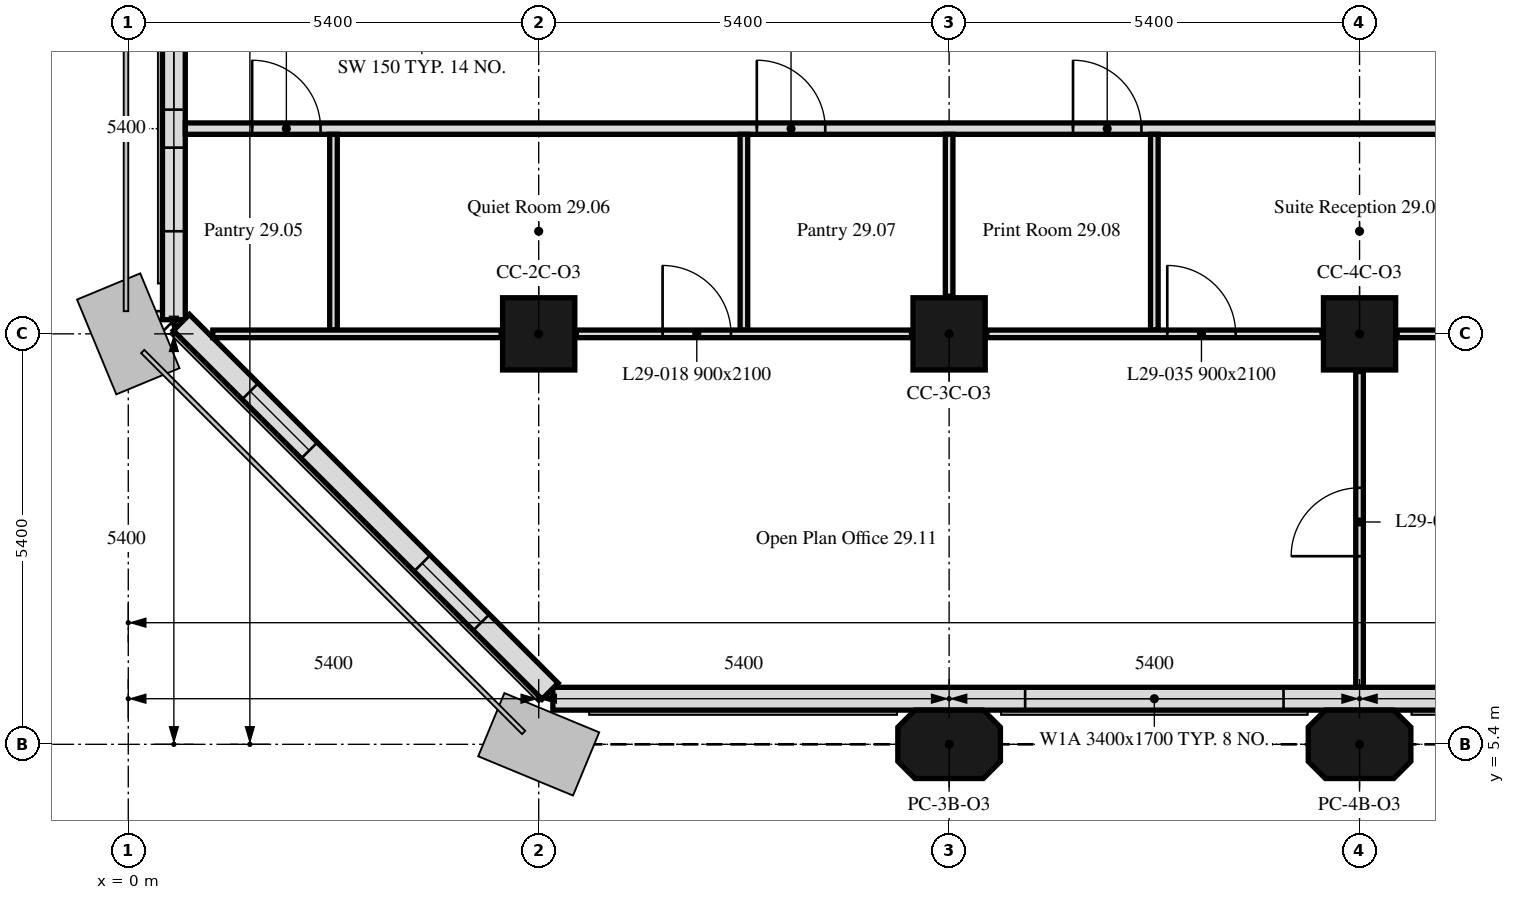
"""IFC4 building model, lengths in metres.
Left out: names, types, materials, properties, quantities, classifications, styles, units other than length and angle.
Written with IfcOpenShell. Run it as: python <this file> out.ifc"""

import sys

from ifc_helpers import new_model, si_unit, direction, frame, frame_2d, origin, origin_2d, place, context, subcontext, project, spatial, polyline, rectangle, outline, extrude, element, fill, save


model = new_model("IFC4")
c1 = context("Model", 3, precision=1e-05, world=origin(), true_north=direction((0.0, 1.0)))
c2 = subcontext(c1, "Body", "Model", "MODEL_VIEW")
j1 = project(units=[si_unit("LENGTHUNIT", "METRE"), si_unit("PLANEANGLEUNIT", "RADIAN")], contexts=[c1])
p1 = place(None, origin())
s1 = spatial("IfcSite", under=j1, at=p1, CompositionType="ELEMENT")
p2 = place(p1, origin())
s2 = spatial("IfcBuilding", under=s1, at=p2, CompositionType="ELEMENT")
p3 = place(p2, frame((0.0, 0.0, 122.0)))
s3 = spatial("IfcBuildingStorey", under=s2, at=p3, CompositionType="ELEMENT", Elevation=122.0)
for number, where, z_axis, x_axis in (
    (1, (10.8, 5.4, 0.0), (0.0, 0.0, 1.0), (1.0, 0.0, 0.0)),
    (2, (16.2, 5.4, 0.0), (0.0, 0.0, 1.0), (1.0, 0.0, 0.0)),
):
    element("IfcColumn", number, at=place(p3, frame(where, z_axis=z_axis, x_axis=x_axis)), inside=s3, PredefinedType="COLUMN", context=c2, shape_type="SweptSolid", body=[
        extrude(outline(polyline([(-0.45, -0.45), (0.45, -0.45), (0.675, -0.225), (0.675, 0.225), (0.45, 0.45), (-0.45, 0.45), (-0.675, 0.225), (-0.675, -0.225), (-0.45, -0.45)])), origin(), (0.0, 0.0, 1.0), 3.3),
    ])
for number, where, z_axis, x_axis in (
    (3, (5.4, 10.8, 0.0), (0.0, 0.0, 1.0), (1.0, 0.0, 0.0)),
    (4, (10.8, 10.8, 0.0), (0.0, 0.0, 1.0), (1.0, 0.0, 0.0)),
    (5, (16.2, 10.8, 0.0), (0.0, 0.0, 1.0), (1.0, 0.0, 0.0)),
):
    element("IfcColumn", number, at=place(p3, frame(where, z_axis=z_axis, x_axis=x_axis)), inside=s3, PredefinedType="COLUMN", context=c2, shape_type="SweptSolid", body=[
        extrude(rectangle(XDim=0.95, YDim=0.95, at=origin_2d()), origin(), (0.0, 0.0, 1.0), 3.3),
    ])
p4 = place(p3, frame((5.586, 6.0, 0.0), z_axis=(0.0, 0.0, 1.0), x_axis=(1.0, 0.0, 0.0)))
e6 = element("IfcWall", 6, at=p4, inside=s3, PredefinedType="SOLIDWALL", context=c2, shape_type="SweptSolid", body=[
    extrude(rectangle(XDim=32.027, YDim=0.3, at=frame_2d((16.014, 0.0))), origin(), (0.0, 0.0, 1.0), 3.3),
])
p5 = place(p4, frame((6.214, 0.0, 0.9)))
e7 = element("IfcOpeningElement", 7, at=p5, cuts=e6, PredefinedType="OPENING", context=c2, shape_type="SweptSolid", body=[
    extrude(rectangle(XDim=3.4, YDim=1.7, at=frame_2d((1.7, 0.85))), frame((0.0, 0.16, 0.0), z_axis=(0.0, -1.0, 0.0), x_axis=(1.0, 0.0, 0.0)), (0.0, 0.0, 1.0), 0.32),
])
p6 = place(p4, frame((17.014, 0.0, 0.9)))
e8 = element("IfcOpeningElement", 8, at=p6, cuts=e6, PredefinedType="OPENING", context=c2, shape_type="SweptSolid", body=[
    extrude(rectangle(XDim=3.4, YDim=1.7, at=frame_2d((1.7, 0.85))), frame((0.0, 0.16, 0.0), z_axis=(0.0, -1.0, 0.0), x_axis=(1.0, 0.0, 0.0)), (0.0, 0.0, 1.0), 0.32),
])
p7 = place(p4, frame((27.814, 0.0, 0.9)))
e9 = element("IfcOpeningElement", 9, at=p7, cuts=e6, PredefinedType="OPENING", context=c2, shape_type="SweptSolid", body=[
    extrude(rectangle(XDim=3.4, YDim=1.7, at=frame_2d((1.7, 0.85))), frame((0.0, 0.16, 0.0), z_axis=(0.0, -1.0, 0.0), x_axis=(1.0, 0.0, 0.0)), (0.0, 0.0, 1.0), 0.32),
])
p8 = place(p3, frame((0.6, 43.014, 0.0), z_axis=(0.0, 0.0, 1.0), x_axis=(0.0, -1.0, 0.0)))
e10 = element("IfcWall", 10, at=p8, inside=s3, PredefinedType="SOLIDWALL", context=c2, shape_type="SweptSolid", body=[
    extrude(rectangle(XDim=32.027, YDim=0.3, at=frame_2d((16.014, 0.0))), origin(), (0.0, 0.0, 1.0), 3.3),
])
p9 = place(p8, frame((6.564, 0.0, 0.9)))
e11 = element("IfcOpeningElement", 11, at=p9, cuts=e10, PredefinedType="OPENING", context=c2, shape_type="SweptSolid", body=[
    extrude(rectangle(XDim=1.1, YDim=1.7, at=frame_2d((0.55, 0.85))), frame((0.0, 0.16, 0.0), z_axis=(0.0, -1.0, 0.0), x_axis=(1.0, 0.0, 0.0)), (0.0, 0.0, 1.0), 0.32),
])
p10 = place(p8, frame((8.164, 0.0, 0.9)))
e12 = element("IfcOpeningElement", 12, at=p10, cuts=e10, PredefinedType="OPENING", context=c2, shape_type="SweptSolid", body=[
    extrude(rectangle(XDim=1.1, YDim=1.7, at=frame_2d((0.55, 0.85))), frame((0.0, 0.16, 0.0), z_axis=(0.0, -1.0, 0.0), x_axis=(1.0, 0.0, 0.0)), (0.0, 0.0, 1.0), 0.32),
])
p11 = place(p8, frame((17.014, 0.0, 0.9)))
e13 = element("IfcOpeningElement", 13, at=p11, cuts=e10, PredefinedType="OPENING", context=c2, shape_type="SweptSolid", body=[
    extrude(rectangle(XDim=3.4, YDim=1.7, at=frame_2d((1.7, 0.85))), frame((0.0, 0.16, 0.0), z_axis=(0.0, -1.0, 0.0), x_axis=(1.0, 0.0, 0.0)), (0.0, 0.0, 1.0), 0.32),
])
p12 = place(p8, frame((28.164, 0.0, 0.9)))
e14 = element("IfcOpeningElement", 14, at=p12, cuts=e10, PredefinedType="OPENING", context=c2, shape_type="SweptSolid", body=[
    extrude(rectangle(XDim=1.1, YDim=1.7, at=frame_2d((0.55, 0.85))), frame((0.0, 0.16, 0.0), z_axis=(0.0, -1.0, 0.0), x_axis=(1.0, 0.0, 0.0)), (0.0, 0.0, 1.0), 0.32),
])
p13 = place(p8, frame((29.764, 0.0, 0.9)))
e15 = element("IfcOpeningElement", 15, at=p13, cuts=e10, PredefinedType="OPENING", context=c2, shape_type="SweptSolid", body=[
    extrude(rectangle(XDim=1.1, YDim=1.7, at=frame_2d((0.55, 0.85))), frame((0.0, 0.16, 0.0), z_axis=(0.0, -1.0, 0.0), x_axis=(1.0, 0.0, 0.0)), (0.0, 0.0, 1.0), 0.32),
])
p14 = place(p3, frame((0.699, 10.949, 0.0), z_axis=(0.0, 0.0, 1.0), x_axis=(0.707106781187, -0.707106781187, 0.0)))
e16 = element("IfcWall", 16, at=p14, inside=s3, PredefinedType="SOLIDWALL", context=c2, shape_type="SweptSolid", body=[
    extrude(rectangle(XDim=6.86, YDim=0.3, at=frame_2d((3.43, 0.0))), origin(), (0.0, 0.0, 1.0), 3.3),
])
p15 = place(p14, frame((1.28, 0.0, 0.9)))
e17 = element("IfcOpeningElement", 17, at=p15, cuts=e16, PredefinedType="OPENING", context=c2, shape_type="SweptSolid", body=[
    extrude(rectangle(XDim=1.1, YDim=1.7, at=frame_2d((0.55, 0.85))), frame((0.0, 0.16, 0.0), z_axis=(0.0, -1.0, 0.0), x_axis=(1.0, 0.0, 0.0)), (0.0, 0.0, 1.0), 0.32),
])
p16 = place(p14, frame((4.48, 0.0, 0.9)))
e18 = element("IfcOpeningElement", 18, at=p16, cuts=e16, PredefinedType="OPENING", context=c2, shape_type="SweptSolid", body=[
    extrude(rectangle(XDim=1.1, YDim=1.7, at=frame_2d((0.55, 0.85))), frame((0.0, 0.16, 0.0), z_axis=(0.0, -1.0, 0.0), x_axis=(1.0, 0.0, 0.0)), (0.0, 0.0, 1.0), 0.32),
])
p17 = place(p3, frame((0.751, 13.5, 0.0), z_axis=(0.0, 0.0, 1.0), x_axis=(1.0, 0.0, 0.0)))
e19 = element("IfcWall", 19, at=p17, inside=s3, PredefinedType="PARTITIONING", context=c2, shape_type="SweptSolid", body=[
    extrude(rectangle(XDim=41.698, YDim=0.15, at=frame_2d((20.849, 0.0))), origin(), (0.0, 0.0, 1.0), 2.55),
])
p18 = place(p17, frame((0.879, 0.0, 0.0)))
e20 = element("IfcOpeningElement", 20, at=p18, cuts=e19, PredefinedType="OPENING", context=c2, shape_type="SweptSolid", body=[
    extrude(rectangle(XDim=0.9, YDim=2.1, at=frame_2d((0.45, 1.05))), frame((0.0, 0.075, 0.0), z_axis=(0.0, -1.0, 0.0), x_axis=(1.0, 0.0, 0.0)), (0.0, 0.0, 1.0), 0.15),
])
p19 = place(p17, frame((7.519, 0.0, 0.0)))
e21 = element("IfcOpeningElement", 21, at=p19, cuts=e19, PredefinedType="OPENING", context=c2, shape_type="SweptSolid", body=[
    extrude(rectangle(XDim=0.9, YDim=2.1, at=frame_2d((0.45, 1.05))), frame((0.0, 0.075, 0.0), z_axis=(0.0, -1.0, 0.0), x_axis=(1.0, 0.0, 0.0)), (0.0, 0.0, 1.0), 0.15),
])
p20 = place(p17, frame((11.679, 0.0, 0.0)))
e22 = element("IfcOpeningElement", 22, at=p20, cuts=e19, PredefinedType="OPENING", context=c2, shape_type="SweptSolid", body=[
    extrude(rectangle(XDim=0.9, YDim=2.1, at=frame_2d((0.45, 1.05))), frame((0.0, 0.075, 0.0), z_axis=(0.0, -1.0, 0.0), x_axis=(1.0, 0.0, 0.0)), (0.0, 0.0, 1.0), 0.15),
])
p21 = place(p17, frame((22.479, 0.0, 0.0)))
e23 = element("IfcOpeningElement", 23, at=p21, cuts=e19, PredefinedType="OPENING", context=c2, shape_type="SweptSolid", body=[
    extrude(rectangle(XDim=0.9, YDim=2.1, at=frame_2d((0.45, 1.05))), frame((0.0, 0.075, 0.0), z_axis=(0.0, -1.0, 0.0), x_axis=(1.0, 0.0, 0.0)), (0.0, 0.0, 1.0), 0.15),
])
p22 = place(p17, frame((33.899, 0.0, 0.0)))
e24 = element("IfcOpeningElement", 24, at=p22, cuts=e19, PredefinedType="OPENING", context=c2, shape_type="SweptSolid", body=[
    extrude(rectangle(XDim=0.9, YDim=2.1, at=frame_2d((0.45, 1.05))), frame((0.0, 0.075, 0.0), z_axis=(0.0, -1.0, 0.0), x_axis=(1.0, 0.0, 0.0)), (0.0, 0.0, 1.0), 0.15),
])
p23 = place(p17, frame((17.079, 0.0, 0.0)))
e25 = element("IfcOpeningElement", 25, at=p23, cuts=e19, PredefinedType="OPENING", context=c2, shape_type="SweptSolid", body=[
    extrude(rectangle(XDim=0.9, YDim=2.1, at=frame_2d((0.45, 1.05))), frame((0.0, 0.075, 0.0), z_axis=(0.0, -1.0, 0.0), x_axis=(1.0, 0.0, 0.0)), (0.0, 0.0, 1.0), 0.15),
])
p24 = place(p17, frame((27.879, 0.0, 0.0)))
e26 = element("IfcOpeningElement", 26, at=p24, cuts=e19, PredefinedType="OPENING", context=c2, shape_type="SweptSolid", body=[
    extrude(rectangle(XDim=0.9, YDim=2.1, at=frame_2d((0.45, 1.05))), frame((0.0, 0.075, 0.0), z_axis=(0.0, -1.0, 0.0), x_axis=(1.0, 0.0, 0.0)), (0.0, 0.0, 1.0), 0.15),
])
p25 = place(p3, frame((2.7, 10.85, 0.0), z_axis=(0.0, 0.0, 1.0), x_axis=(0.0, 1.0, 0.0)))
e27 = element("IfcWall", 27, at=p25, inside=s3, PredefinedType="PARTITIONING", context=c2, shape_type="SweptSolid", body=[
    extrude(rectangle(XDim=2.575, YDim=0.1, at=frame_2d((1.288, 0.0))), origin(), (0.0, 0.0, 1.0), 3.3),
])
p26 = place(p3, frame((1.112, 10.8, 0.0), z_axis=(0.0, 0.0, 1.0), x_axis=(1.0, 0.0, 0.0)))
e28 = element("IfcWall", 28, at=p26, inside=s3, PredefinedType="PARTITIONING", context=c2, shape_type="SweptSolid", body=[
    extrude(rectangle(XDim=3.793, YDim=0.1, at=frame_2d((1.896, 0.0))), origin(), (0.0, 0.0, 1.0), 2.55),
])
p27 = place(p3, frame((8.1, 10.85, 0.0), z_axis=(0.0, 0.0, 1.0), x_axis=(0.0, 1.0, 0.0)))
e29 = element("IfcWall", 29, at=p27, inside=s3, PredefinedType="PARTITIONING", context=c2, shape_type="SweptSolid", body=[
    extrude(rectangle(XDim=2.575, YDim=0.1, at=frame_2d((1.288, 0.0))), origin(), (0.0, 0.0, 1.0), 3.3),
])
p28 = place(p3, frame((5.895, 10.8, 0.0), z_axis=(0.0, 0.0, 1.0), x_axis=(1.0, 0.0, 0.0)))
e30 = element("IfcWall", 30, at=p28, inside=s3, PredefinedType="PARTITIONING", context=c2, shape_type="SweptSolid", body=[
    extrude(rectangle(XDim=4.41, YDim=0.1, at=frame_2d((2.205, 0.0))), origin(), (0.0, 0.0, 1.0), 2.55),
])
p29 = place(p28, frame((1.135, 0.0, 0.0)))
e31 = element("IfcOpeningElement", 31, at=p29, cuts=e30, PredefinedType="OPENING", context=c2, shape_type="SweptSolid", body=[
    extrude(rectangle(XDim=0.9, YDim=2.1, at=frame_2d((0.45, 1.05))), frame((0.0, 0.05, 0.0), z_axis=(0.0, -1.0, 0.0), x_axis=(1.0, 0.0, 0.0)), (0.0, 0.0, 1.0), 0.1),
])
p30 = place(p3, frame((10.8, 11.295, 0.0), z_axis=(0.0, 0.0, 1.0), x_axis=(0.0, 1.0, 0.0)))
e32 = element("IfcWall", 32, at=p30, inside=s3, PredefinedType="PARTITIONING", context=c2, shape_type="SweptSolid", body=[
    extrude(rectangle(XDim=2.13, YDim=0.1, at=frame_2d((1.065, 0.0))), origin(), (0.0, 0.0, 1.0), 2.55),
])
p31 = place(p3, frame((13.5, 10.85, 0.0), z_axis=(0.0, 0.0, 1.0), x_axis=(0.0, 1.0, 0.0)))
e33 = element("IfcWall", 33, at=p31, inside=s3, PredefinedType="PARTITIONING", context=c2, shape_type="SweptSolid", body=[
    extrude(rectangle(XDim=2.575, YDim=0.1, at=frame_2d((1.288, 0.0))), origin(), (0.0, 0.0, 1.0), 3.3),
])
p32 = place(p3, frame((11.295, 10.8, 0.0), z_axis=(0.0, 0.0, 1.0), x_axis=(1.0, 0.0, 0.0)))
e34 = element("IfcWall", 34, at=p32, inside=s3, PredefinedType="PARTITIONING", context=c2, shape_type="SweptSolid", body=[
    extrude(rectangle(XDim=4.41, YDim=0.1, at=frame_2d((2.205, 0.0))), origin(), (0.0, 0.0, 1.0), 2.55),
])
p33 = place(p32, frame((2.375, 0.0, 0.0)))
e35 = element("IfcOpeningElement", 35, at=p33, cuts=e34, PredefinedType="OPENING", context=c2, shape_type="SweptSolid", body=[
    extrude(rectangle(XDim=0.9, YDim=2.1, at=frame_2d((0.45, 1.05))), frame((0.0, 0.05, 0.0), z_axis=(0.0, -1.0, 0.0), x_axis=(1.0, 0.0, 0.0)), (0.0, 0.0, 1.0), 0.1),
])
p34 = place(p3, frame((16.695, 10.8, 0.0), z_axis=(0.0, 0.0, 1.0), x_axis=(1.0, 0.0, 0.0)))
e36 = element("IfcWall", 36, at=p34, inside=s3, PredefinedType="PARTITIONING", context=c2, shape_type="SweptSolid", body=[
    extrude(rectangle(XDim=4.41, YDim=0.1, at=frame_2d((2.205, 0.0))), origin(), (0.0, 0.0, 1.0), 3.3),
])
p35 = place(p3, frame((16.2, 6.151, 0.0), z_axis=(0.0, 0.0, 1.0), x_axis=(0.0, 1.0, 0.0)))
e37 = element("IfcWall", 37, at=p35, inside=s3, PredefinedType="PARTITIONING", context=c2, shape_type="SweptSolid", body=[
    extrude(rectangle(XDim=4.154, YDim=0.1, at=frame_2d((2.077, 0.0))), origin(), (0.0, 0.0, 1.0), 2.55),
])
p36 = place(p35, frame((1.724, 0.0, 0.0)))
e38 = element("IfcOpeningElement", 38, at=p36, cuts=e37, PredefinedType="OPENING", context=c2, shape_type="SweptSolid", body=[
    extrude(rectangle(XDim=0.9, YDim=2.1, at=frame_2d((0.45, 1.05))), frame((0.0, 0.05, 0.0), z_axis=(0.0, -1.0, 0.0), x_axis=(1.0, 0.0, 0.0)), (0.0, 0.0, 1.0), 0.1),
])
p37 = place(p5, origin())
e39 = element("IfcWindow", 39, at=p37, inside=s3, PartitioningType="SINGLE_PANEL", PredefinedType="WINDOW", context=c2, shape_type="SweptSolid", body=[
    extrude(rectangle(XDim=3.4, YDim=1.7, at=frame_2d((1.7, 0.85))), frame((0.0, 0.03, 0.0), z_axis=(0.0, -1.0, 0.0), x_axis=(1.0, 0.0, 0.0)), (0.0, 0.0, 1.0), 0.06),
])
fill(e7, e39)
p38 = place(p12, origin())
e40 = element("IfcWindow", 40, at=p38, inside=s3, PartitioningType="SINGLE_PANEL", PredefinedType="WINDOW", context=c2, shape_type="SweptSolid", body=[
    extrude(rectangle(XDim=1.1, YDim=1.7, at=frame_2d((0.55, 0.85))), frame((0.0, 0.03, 0.0), z_axis=(0.0, -1.0, 0.0), x_axis=(1.0, 0.0, 0.0)), (0.0, 0.0, 1.0), 0.06),
])
fill(e14, e40)
p39 = place(p13, origin())
e41 = element("IfcWindow", 41, at=p39, inside=s3, PartitioningType="SINGLE_PANEL", PredefinedType="WINDOW", context=c2, shape_type="SweptSolid", body=[
    extrude(rectangle(XDim=1.1, YDim=1.7, at=frame_2d((0.55, 0.85))), frame((0.0, 0.03, 0.0), z_axis=(0.0, -1.0, 0.0), x_axis=(1.0, 0.0, 0.0)), (0.0, 0.0, 1.0), 0.06),
])
fill(e15, e41)
p40 = place(p15, origin())
e42 = element("IfcWindow", 42, at=p40, inside=s3, PartitioningType="SINGLE_PANEL", PredefinedType="WINDOW", context=c2, shape_type="SweptSolid", body=[
    extrude(rectangle(XDim=1.1, YDim=1.7, at=frame_2d((0.55, 0.85))), frame((0.0, 0.03, 0.0), z_axis=(0.0, -1.0, 0.0), x_axis=(1.0, 0.0, 0.0)), (0.0, 0.0, 1.0), 0.06),
])
fill(e17, e42)
p41 = place(p16, origin())
e43 = element("IfcWindow", 43, at=p41, inside=s3, PartitioningType="SINGLE_PANEL", PredefinedType="WINDOW", context=c2, shape_type="SweptSolid", body=[
    extrude(rectangle(XDim=1.1, YDim=1.7, at=frame_2d((0.55, 0.85))), frame((0.0, 0.03, 0.0), z_axis=(0.0, -1.0, 0.0), x_axis=(1.0, 0.0, 0.0)), (0.0, 0.0, 1.0), 0.06),
])
fill(e18, e43)
p42 = place(p18, origin())
e44 = element("IfcDoor", 44, at=p42, inside=s3, OperationType="SINGLE_SWING_RIGHT", PredefinedType="DOOR", context=c2, shape_type="SweptSolid", body=[
    extrude(rectangle(XDim=0.9, YDim=2.1, at=frame_2d((0.45, 1.05))), frame((0.0, 0.025, 0.0), z_axis=(0.0, -1.0, 0.0), x_axis=(1.0, 0.0, 0.0)), (0.0, 0.0, 1.0), 0.05),
])
fill(e20, e44)
p43 = place(p19, origin())
e45 = element("IfcDoor", 45, at=p43, inside=s3, OperationType="SINGLE_SWING_RIGHT", PredefinedType="DOOR", context=c2, shape_type="SweptSolid", body=[
    extrude(rectangle(XDim=0.9, YDim=2.1, at=frame_2d((0.45, 1.05))), frame((0.0, 0.025, 0.0), z_axis=(0.0, -1.0, 0.0), x_axis=(1.0, 0.0, 0.0)), (0.0, 0.0, 1.0), 0.05),
])
fill(e21, e45)
p44 = place(p20, origin())
e46 = element("IfcDoor", 46, at=p44, inside=s3, OperationType="SINGLE_SWING_RIGHT", PredefinedType="DOOR", context=c2, shape_type="SweptSolid", body=[
    extrude(rectangle(XDim=0.9, YDim=2.1, at=frame_2d((0.45, 1.05))), frame((0.0, 0.025, 0.0), z_axis=(0.0, -1.0, 0.0), x_axis=(1.0, 0.0, 0.0)), (0.0, 0.0, 1.0), 0.05),
])
fill(e22, e46)
p45 = place(p29, origin())
e47 = element("IfcDoor", 47, at=p45, inside=s3, OperationType="SINGLE_SWING_LEFT", PredefinedType="DOOR", context=c2, shape_type="SweptSolid", body=[
    extrude(rectangle(XDim=0.9, YDim=2.1, at=frame_2d((0.45, 1.05))), frame((0.0, 0.025, 0.0), z_axis=(0.0, -1.0, 0.0), x_axis=(1.0, 0.0, 0.0)), (0.0, 0.0, 1.0), 0.05),
])
fill(e31, e47)
p46 = place(p36, origin())
e48 = element("IfcDoor", 48, at=p46, inside=s3, OperationType="SINGLE_SWING_RIGHT", PredefinedType="DOOR", context=c2, shape_type="SweptSolid", body=[
    extrude(rectangle(XDim=0.9, YDim=2.1, at=frame_2d((0.45, 1.05))), frame((0.0, 0.025, 0.0), z_axis=(0.0, -1.0, 0.0), x_axis=(1.0, 0.0, 0.0)), (0.0, 0.0, 1.0), 0.05),
])
fill(e38, e48)
p47 = place(p33, origin())
e49 = element("IfcDoor", 49, at=p47, inside=s3, OperationType="SINGLE_SWING_LEFT", PredefinedType="DOOR", context=c2, shape_type="SweptSolid", body=[
    extrude(rectangle(XDim=0.9, YDim=2.1, at=frame_2d((0.45, 1.05))), frame((0.0, 0.025, 0.0), z_axis=(0.0, -1.0, 0.0), x_axis=(1.0, 0.0, 0.0)), (0.0, 0.0, 1.0), 0.05),
])
fill(e35, e49)
save(model, sys.argv[1])
